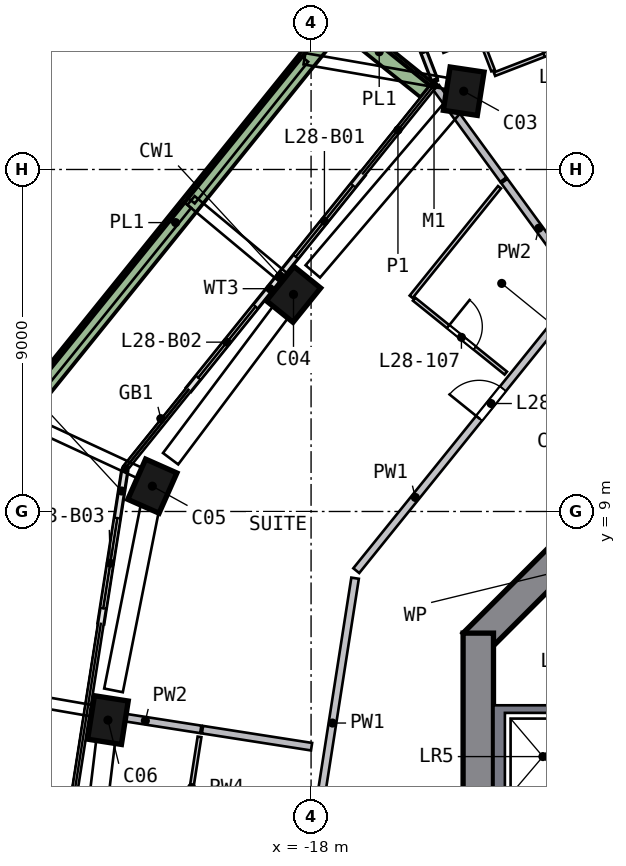
"""IFC4 building model, lengths in metres.
Left out: names, types, materials, properties, quantities, classifications, styles, units other than length and angle.
Written with IfcOpenShell. Run it as: python <this file> out.ifc"""

import sys

from ifc_helpers import new_model, si_unit, direction, frame, frame_2d, origin, origin_2d, place, context, subcontext, project, spatial, polyline, rectangle, outline, extrude, element, fill, save


model = new_model("IFC4")
c1 = context("Model", 3, precision=1e-05, world=origin(), true_north=direction((0.0, 1.0)))
c2 = subcontext(c1, "Body", "Model", "MODEL_VIEW")
j1 = project(units=[si_unit("LENGTHUNIT", "METRE"), si_unit("PLANEANGLEUNIT", "RADIAN")], contexts=[c1])
p1 = place(None, origin())
s1 = spatial("IfcSite", under=j1, at=p1, CompositionType="ELEMENT")
p2 = place(p1, origin())
s2 = spatial("IfcBuilding", under=s1, at=p2, CompositionType="ELEMENT")
p3 = place(p2, frame((0.0, 0.0, 118.5)))
s3 = spatial("IfcBuildingStorey", under=s2, at=p3, CompositionType="ELEMENT", Elevation=118.5)
p4 = place(p3, frame((-14.214, 21.896, 0.0), z_axis=(-0.046959321, -0.203118963, 0.978027356), x_axis=(0.37393507, -0.911489504, -0.17134599)))
e1 = element("IfcColumn", 1, at=p4, inside=s3, PredefinedType="COLUMN", context=c2, shape_type="SweptSolid", body=[
    extrude(rectangle(XDim=0.8, YDim=0.8, at=origin_2d()), origin(), (0.0, 0.0, 1.0), 3.067),
])
p5 = place(p3, frame((-13.869, 20.141, 0.0), z_axis=(-0.095215462, -0.066763983, 0.993215277), x_axis=(0.14705259, 0.985858366, 0.080366777)))
e2 = element("IfcColumn", 2, at=p5, inside=s3, PredefinedType="COLUMN", context=c2, shape_type="SweptSolid", body=[
    extrude(rectangle(XDim=1.15, YDim=0.9, at=origin_2d()), origin(), (0.0, 0.0, 1.0), 3.021),
])
p6 = place(p3, frame((-18.378, 14.819, 0.0), z_axis=(-0.069786874, -0.087981597, 0.99367451), x_axis=(-0.624093395, -0.773238231, -0.11229458)))
e3 = element("IfcColumn", 3, at=p6, inside=s3, PredefinedType="COLUMN", context=c2, shape_type="SweptSolid", body=[
    extrude(rectangle(XDim=1.15, YDim=0.9, at=origin_2d()), origin(), (0.0, 0.0, 1.0), 3.019),
])
p7 = place(p3, frame((-22.122, 9.794, 0.0), z_axis=(-0.045755258, -0.105576619, 0.993357959), x_axis=(0.402729542, 0.908058308, 0.11506096)))
e4 = element("IfcColumn", 4, at=p7, inside=s3, PredefinedType="COLUMN", context=c2, shape_type="SweptSolid", body=[
    extrude(rectangle(XDim=1.15, YDim=0.9, at=origin_2d()), origin(), (0.0, 0.0, 1.0), 3.02),
])
p8 = place(p3, frame((-23.325, 3.644, 0.0), z_axis=(-0.016415653, -0.111108905, 0.993672651), x_axis=(-0.153568339, -0.981734689, -0.112311022)))
e5 = element("IfcColumn", 5, at=p8, inside=s3, PredefinedType="COLUMN", context=c2, shape_type="SweptSolid", body=[
    extrude(rectangle(XDim=1.15, YDim=0.9, at=origin_2d()), origin(), (0.0, 0.0, 1.0), 3.019),
])
p9 = place(p3, frame((-5.516, 13.717, 0.0), z_axis=(0.0, 0.0, 1.0), x_axis=(-0.707106781, -0.707106781, 0.0)))
e6 = element("IfcWall", 6, at=p9, inside=s3, PredefinedType="SHEAR", context=c2, shape_type="SweptSolid", body=[
    extrude(rectangle(XDim=11.598, YDim=0.8, at=frame_2d((5.799, 0.0))), origin(), (0.0, 0.0, 1.0), 3.5),
])
p10 = place(p3, frame((-13.6, 5.799, 0.0), z_axis=(0.0, 0.0, 1.0), x_axis=(0.0, -1.0, 0.0)))
e7 = element("IfcWall", 7, at=p10, inside=s3, PredefinedType="SHEAR", context=c2, shape_type="SweptSolid", body=[
    extrude(rectangle(XDim=11.598, YDim=0.8, at=frame_2d((5.799, 0.0))), origin(), (0.0, 0.0, 1.0), 3.5),
])
p11 = place(p10, frame((4.899, 0.0, 0.0)))
e8 = element("IfcOpeningElement", 8, at=p11, cuts=e7, PredefinedType="OPENING", context=c2, shape_type="SweptSolid", body=[
    extrude(rectangle(XDim=1.8, YDim=2.1, at=frame_2d((0.9, 1.05))), frame((0.0, 0.41, 0.0), z_axis=(0.0, -1.0, 0.0), x_axis=(1.0, 0.0, 0.0)), (0.0, 0.0, 1.0), 0.82),
])
p12 = place(p3, frame((-15.361, 21.936, 0.0), z_axis=(0.0, 0.0, 1.0), x_axis=(0.360263271, -0.932850672, 0.0)))
e9 = element("IfcWall", 9, at=p12, inside=s3, PredefinedType="SOLIDWALL", context=c2, shape_type="SweptSolid", body=[
    extrude(rectangle(XDim=1.668, YDim=0.15, at=frame_2d((0.834, 0.0))), origin(), (0.0, 0.0, 1.0), 2.935),
])
p13 = place(p3, frame((-16.645, 17.885, 0.0), z_axis=(0.0, 0.0, 1.0), x_axis=(-0.627731853, -0.778429651, 0.0)))
e10 = element("IfcWall", 10, at=p13, inside=s3, PredefinedType="SOLIDWALL", context=c2, shape_type="SweptSolid", body=[
    extrude(rectangle(XDim=3.475, YDim=0.15, at=frame_2d((1.738, 0.0))), origin(), (0.0, 0.0, 1.0), 2.935),
])
p14 = place(p13, frame((0.4, 0.0, 0.0)))
e11 = element("IfcOpeningElement", 11, at=p14, cuts=e10, PredefinedType="OPENING", context=c2, shape_type="SweptSolid", body=[
    extrude(rectangle(XDim=2.4, YDim=2.4, at=frame_2d((1.2, 1.2))), frame((0.0, 0.085, 0.0), z_axis=(0.0, -1.0, 0.0), x_axis=(1.0, 0.0, 0.0)), (0.0, 0.0, 1.0), 0.17),
])
p15 = place(p3, frame((-18.826, 15.18, 0.0), z_axis=(0.0, 0.0, 1.0), x_axis=(-0.627703654, -0.77845239, 0.0)))
e12 = element("IfcWall", 12, at=p15, inside=s3, PredefinedType="SOLIDWALL", context=c2, shape_type="SweptSolid", body=[
    extrude(rectangle(XDim=3.814, YDim=0.15, at=frame_2d((1.907, 0.0))), origin(), (0.0, 0.0, 1.0), 2.935),
])
p16 = place(p15, frame((1.014, 0.0, 0.0)))
e13 = element("IfcOpeningElement", 13, at=p16, cuts=e12, PredefinedType="OPENING", context=c2, shape_type="SweptSolid", body=[
    extrude(rectangle(XDim=2.4, YDim=2.4, at=frame_2d((1.2, 1.2))), frame((0.0, 0.085, 0.0), z_axis=(0.0, -1.0, 0.0), x_axis=(1.0, 0.0, 0.0)), (0.0, 0.0, 1.0), 0.17),
])
p17 = place(p3, frame((-22.906, 10.056, 0.0), z_axis=(0.0, 0.0, 1.0), x_axis=(-0.154391604, -0.988009733, 0.0)))
e14 = element("IfcWall", 14, at=p17, inside=s3, PredefinedType="SOLIDWALL", context=c2, shape_type="SweptSolid", body=[
    extrude(rectangle(XDim=4.047, YDim=0.15, at=frame_2d((2.023, 0.0))), origin(), (0.0, 0.0, 1.0), 2.935),
])
p18 = place(p17, frame((1.247, 0.0, 0.0)))
e15 = element("IfcOpeningElement", 15, at=p18, cuts=e14, PredefinedType="OPENING", context=c2, shape_type="SweptSolid", body=[
    extrude(rectangle(XDim=2.4, YDim=2.4, at=frame_2d((1.2, 1.2))), frame((0.0, 0.085, 0.0), z_axis=(0.0, -1.0, 0.0), x_axis=(1.0, 0.0, 0.0)), (0.0, 0.0, 1.0), 0.17),
])
p19 = place(p3, frame((-14.962, 20.093, 0.0), z_axis=(0.0, 0.0, 1.0), x_axis=(-0.778443113, 0.627715158, 0.0)))
e16 = element("IfcWall", 16, at=p19, inside=s3, PredefinedType="SOLIDWALL", context=c2, shape_type="SweptSolid", body=[
    extrude(rectangle(XDim=3.199, YDim=0.5, at=frame_2d((1.6, 0.0))), origin(), (0.0, 0.0, 1.0), 0.7),
])
p20 = place(p3, frame((-17.415, 21.749, 0.0), z_axis=(0.0, 0.0, 1.0), x_axis=(-0.627693988, -0.778460183, 0.0)))
e17 = element("IfcWall", 17, at=p20, inside=s3, PredefinedType="SOLIDWALL", context=c2, shape_type="SweptSolid", body=[
    extrude(rectangle(XDim=13.223, YDim=0.5, at=frame_2d((6.612, 0.0))), origin(), (0.0, 0.0, 1.0), 0.7),
])
p21 = place(p3, origin())
e18 = element("IfcWall", 18, at=p21, inside=s3, PredefinedType="SOLIDWALL", context=c2, shape_type="SweptSolid", body=[
    extrude(outline(polyline([(-13.2, 3.9), (-10.9, 3.9), (-10.9, 3.7), (-12.9, 3.7), (-12.9, 1.4), (-10.9, 1.4), (-10.9, 1.2), (-13.2, 1.2), (-13.2, 3.9)])), origin(), (0.0, 0.0, 1.0), 3.0),
])
p22 = place(p3, frame((-18.249, -1.762, 0.0), z_axis=(0.0, 0.0, 1.0), x_axis=(0.154375246, 0.988012289, 0.0)))
e19 = element("IfcWall", 19, at=p22, inside=s3, PredefinedType="SOLIDWALL", context=c2, shape_type="SweptSolid", body=[
    extrude(rectangle(XDim=9.116, YDim=0.2, at=frame_2d((4.558, 0.0))), origin(), (0.0, 0.0, 1.0), 3.0),
])
p23 = place(p22, frame((0.2, 0.0, 0.0)))
e20 = element("IfcOpeningElement", 20, at=p23, cuts=e19, PredefinedType="OPENING", context=c2, shape_type="SweptSolid", body=[
    extrude(rectangle(XDim=1.0, YDim=2.1, at=frame_2d((0.5, 1.05))), frame((0.0, 0.11, 0.0), z_axis=(0.0, -1.0, 0.0), x_axis=(1.0, 0.0, 0.0)), (0.0, 0.0, 1.0), 0.22),
])
p24 = place(p3, frame((-16.811, 7.443, 0.0), z_axis=(0.0, 0.0, 1.0), x_axis=(0.627694567, 0.778459716, 0.0)))
e21 = element("IfcWall", 21, at=p24, inside=s3, PredefinedType="SOLIDWALL", context=c2, shape_type="SweptSolid", body=[
    extrude(rectangle(XDim=9.316, YDim=0.2, at=frame_2d((4.658, 0.0))), origin(), (0.0, 0.0, 1.0), 3.0),
])
p25 = place(p24, frame((5.15, 0.0, 0.0)))
e22 = element("IfcOpeningElement", 22, at=p25, cuts=e21, PredefinedType="OPENING", context=c2, shape_type="SweptSolid", body=[
    extrude(rectangle(XDim=1.0, YDim=2.1, at=frame_2d((0.5, 1.05))), frame((0.0, 0.11, 0.0), z_axis=(0.0, -1.0, 0.0), x_axis=(1.0, 0.0, 0.0)), (0.0, 0.0, 1.0), 0.22),
])
p26 = place(p3, frame((-20.903, 3.266, 0.0), z_axis=(0.0, 0.0, 1.0), x_axis=(-0.988021098, 0.154318856, 0.0)))
e23 = element("IfcWall", 23, at=p26, inside=s3, PredefinedType="SOLIDWALL", context=c2, shape_type="SweptSolid", body=[
    extrude(rectangle(XDim=2.952, YDim=0.2, at=frame_2d((1.476, 0.0))), origin(), (0.0, 0.0, 1.0), 3.0),
])
p27 = place(p3, frame((-17.987, 2.81, 0.0), z_axis=(0.0, 0.0, 1.0), x_axis=(-0.988010431, 0.154387135, 0.0)))
e24 = element("IfcWall", 24, at=p27, inside=s3, PredefinedType="SOLIDWALL", context=c2, shape_type="SweptSolid", body=[
    extrude(rectangle(XDim=2.905, YDim=0.2, at=frame_2d((1.453, 0.0))), origin(), (0.0, 0.0, 1.0), 3.0),
])
p28 = place(p3, frame((-12.941, 17.733, 0.0), z_axis=(0.0, 0.0, 1.0), x_axis=(-0.58946764, 0.807791991, 0.0)))
e25 = element("IfcWall", 25, at=p28, inside=s3, PredefinedType="SOLIDWALL", context=c2, shape_type="SweptSolid", body=[
    extrude(rectangle(XDim=3.011, YDim=0.2, at=frame_2d((1.506, 0.0))), origin(), (0.0, 0.0, 1.0), 3.0),
])
p29 = place(p3, frame((-11.101, 15.212, 0.0), z_axis=(0.0, 0.0, 1.0), x_axis=(-0.589492876, 0.807773576, 0.0)))
e26 = element("IfcWall", 26, at=p29, inside=s3, PredefinedType="SOLIDWALL", context=c2, shape_type="SweptSolid", body=[
    extrude(rectangle(XDim=3.075, YDim=0.2, at=frame_2d((1.537, 0.0))), origin(), (0.0, 0.0, 1.0), 3.0),
])
p30 = place(p3, frame((-21.352, 0.401, 0.0), z_axis=(0.0, 0.0, 1.0), x_axis=(0.154346539, 0.988016774, 0.0)))
e27 = element("IfcWall", 27, at=p30, inside=s3, PredefinedType="PARTITIONING", context=c2, shape_type="SweptSolid", body=[
    extrude(rectangle(XDim=2.7, YDim=0.1, at=frame_2d((1.35, 0.0))), origin(), (0.0, 0.0, 1.0), 3.0),
])
p31 = place(p3, frame((-15.367, 14.65, 0.0), z_axis=(0.0, 0.0, 1.0), x_axis=(0.627672573, 0.778477451, 0.0)))
e28 = element("IfcWall", 28, at=p31, inside=s3, PredefinedType="PARTITIONING", context=c2, shape_type="SweptSolid", body=[
    extrude(rectangle(XDim=3.704, YDim=0.1, at=frame_2d((1.852, 0.0))), origin(), (0.0, 0.0, 1.0), 3.0),
])
p32 = place(p3, frame((-15.289, 14.587, 0.0), z_axis=(0.0, 0.0, 1.0), x_axis=(0.778450282, -0.627706268, 0.0)))
e29 = element("IfcWall", 29, at=p32, inside=s3, PredefinedType="PARTITIONING", context=c2, shape_type="SweptSolid", body=[
    extrude(rectangle(XDim=3.1, YDim=0.1, at=frame_2d((1.55, 0.0))), origin(), (0.0, 0.0, 1.0), 3.0),
])
p33 = place(p32, frame((1.15, 0.0, 0.0)))
e30 = element("IfcOpeningElement", 30, at=p33, cuts=e29, PredefinedType="OPENING", context=c2, shape_type="SweptSolid", body=[
    extrude(rectangle(XDim=0.9, YDim=2.1, at=frame_2d((0.45, 1.05))), frame((0.0, 0.06, 0.0), z_axis=(0.0, -1.0, 0.0), x_axis=(1.0, 0.0, 0.0)), (0.0, 0.0, 1.0), 0.12),
])
p34 = place(p3, frame((-13.21, 20.601, 0.0), z_axis=(0.0, 0.0, 1.0), x_axis=(-0.360338698, 0.932821539, 0.0)))
e31 = element("IfcWall", 31, at=p34, inside=s3, PredefinedType="PARTITIONING", context=c2, shape_type="SweptSolid", body=[
    extrude(rectangle(XDim=2.55, YDim=0.1, at=frame_2d((1.275, 0.0))), origin(), (0.0, 0.0, 1.0), 3.0),
])
p35 = place(p3, frame((-13.174, 20.507, 0.0), z_axis=(0.0, 0.0, 1.0), x_axis=(0.932816785, 0.360351003, 0.0)))
e32 = element("IfcWall", 32, at=p35, inside=s3, PredefinedType="PARTITIONING", context=c2, shape_type="SweptSolid", body=[
    extrude(rectangle(XDim=3.6, YDim=0.1, at=frame_2d((1.8, 0.0))), origin(), (0.0, 0.0, 1.0), 3.0),
])
p36 = place(p35, frame((1.4, 0.0, 0.0)))
e33 = element("IfcOpeningElement", 33, at=p36, cuts=e32, PredefinedType="OPENING", context=c2, shape_type="SweptSolid", body=[
    extrude(rectangle(XDim=1.0, YDim=2.1, at=frame_2d((0.5, 1.05))), frame((0.0, 0.06, 0.0), z_axis=(0.0, -1.0, 0.0), x_axis=(1.0, 0.0, 0.0)), (0.0, 0.0, 1.0), 0.12),
])
p37 = place(p14, origin())
e34 = element("IfcDoor", 34, at=p37, inside=s3, OperationType="SLIDING_TO_RIGHT", PredefinedType="DOOR", context=c2, shape_type="SweptSolid", body=[
    extrude(rectangle(XDim=2.4, YDim=2.4, at=frame_2d((1.2, 1.2))), frame((0.0, 0.025, 0.0), z_axis=(0.0, -1.0, 0.0), x_axis=(1.0, 0.0, 0.0)), (0.0, 0.0, 1.0), 0.05),
])
fill(e11, e34)
p38 = place(p16, origin())
e35 = element("IfcDoor", 35, at=p38, inside=s3, OperationType="SLIDING_TO_LEFT", PredefinedType="DOOR", context=c2, shape_type="SweptSolid", body=[
    extrude(rectangle(XDim=2.4, YDim=2.4, at=frame_2d((1.2, 1.2))), frame((0.0, 0.025, 0.0), z_axis=(0.0, -1.0, 0.0), x_axis=(1.0, 0.0, 0.0)), (0.0, 0.0, 1.0), 0.05),
])
fill(e13, e35)
p39 = place(p18, origin())
e36 = element("IfcDoor", 36, at=p39, inside=s3, OperationType="SLIDING_TO_LEFT", PredefinedType="DOOR", context=c2, shape_type="SweptSolid", body=[
    extrude(rectangle(XDim=2.4, YDim=2.4, at=frame_2d((1.2, 1.2))), frame((0.0, 0.025, 0.0), z_axis=(0.0, -1.0, 0.0), x_axis=(1.0, 0.0, 0.0)), (0.0, 0.0, 1.0), 0.05),
])
fill(e15, e36)
p40 = place(p36, origin())
e37 = element("IfcDoor", 37, at=p40, inside=s3, OperationType="SINGLE_SWING_LEFT", PredefinedType="DOOR", context=c2, shape_type="SweptSolid", body=[
    extrude(rectangle(XDim=1.0, YDim=2.1, at=frame_2d((0.5, 1.05))), frame((0.0, 0.025, 0.0), z_axis=(0.0, -1.0, 0.0), x_axis=(1.0, 0.0, 0.0)), (0.0, 0.0, 1.0), 0.05),
])
fill(e33, e37)
p41 = place(p25, origin())
e38 = element("IfcDoor", 38, at=p41, inside=s3, OperationType="SINGLE_SWING_LEFT", PredefinedType="DOOR", context=c2, shape_type="SweptSolid", body=[
    extrude(rectangle(XDim=1.0, YDim=2.1, at=frame_2d((0.5, 1.05))), frame((0.0, 0.025, 0.0), z_axis=(0.0, -1.0, 0.0), x_axis=(1.0, 0.0, 0.0)), (0.0, 0.0, 1.0), 0.05),
])
fill(e22, e38)
p42 = place(p33, origin())
e39 = element("IfcDoor", 39, at=p42, inside=s3, OperationType="SINGLE_SWING_LEFT", PredefinedType="DOOR", context=c2, shape_type="SweptSolid", body=[
    extrude(rectangle(XDim=0.9, YDim=2.1, at=frame_2d((0.45, 1.05))), frame((0.0, 0.025, 0.0), z_axis=(0.0, -1.0, 0.0), x_axis=(1.0, 0.0, 0.0)), (0.0, 0.0, 1.0), 0.05),
])
fill(e30, e39)
save(model, sys.argv[1])
